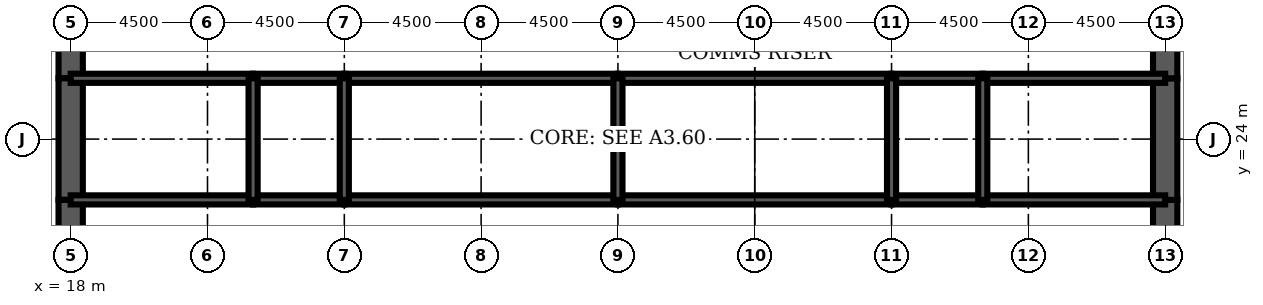
"""IFC4 building model, lengths in metres.
Left out: names, types, materials, properties, quantities, classifications, styles, units other than length and angle.
Written with IfcOpenShell. Run it as: python <this file> out.ifc"""

import sys

from ifc_helpers import new_model, si_unit, direction, frame, frame_2d, origin, place, context, subcontext, project, spatial, rectangle, extrude, element, fill, save


model = new_model("IFC4")
c1 = context("Model", 3, precision=1e-05, world=origin(), true_north=direction((0.0, 1.0)))
c2 = subcontext(c1, "Body", "Model", "MODEL_VIEW")
j1 = project(units=[si_unit("LENGTHUNIT", "METRE"), si_unit("PLANEANGLEUNIT", "RADIAN")], contexts=[c1])
p1 = place(None, origin())
s1 = spatial("IfcSite", under=j1, at=p1, CompositionType="ELEMENT")
p2 = place(p1, origin())
s2 = spatial("IfcBuilding", under=s1, at=p2, CompositionType="ELEMENT")
p3 = place(p2, frame((0.0, 0.0, 257.2)))
s3 = spatial("IfcBuildingStorey", under=s2, at=p3, CompositionType="ELEMENT", Elevation=257.2)
p4 = place(p3, frame((18.0, 28.8, 0.0), z_axis=(0.0, 0.0, 1.0), x_axis=(0.0, -1.0, 0.0)))
e1 = element("IfcWall", 1, at=p4, inside=s3, PredefinedType="SHEAR", context=c2, shape_type="SweptSolid", body=[
    extrude(rectangle(XDim=2.8, YDim=0.8, at=frame_2d((1.4, 0.0))), origin(), (0.0, 0.0, 1.0), 4.2),
])
p5 = place(p4, frame((0.4, 0.0, 0.0)))
e2 = element("IfcOpeningElement", 2, at=p5, cuts=e1, PredefinedType="OPENING", context=c2, shape_type="SweptSolid", body=[
    extrude(rectangle(XDim=1.8, YDim=2.1, at=frame_2d((0.9, 1.05))), frame((0.0, 0.41, 0.0), z_axis=(0.0, -1.0, 0.0), x_axis=(1.0, 0.0, 0.0)), (0.0, 0.0, 1.0), 0.82),
])
p6 = place(p3, frame((18.0, 26.0, 0.0), z_axis=(0.0, 0.0, 1.0), x_axis=(0.0, -1.0, 0.0)))
e3 = element("IfcWall", 3, at=p6, inside=s3, PredefinedType="SHEAR", context=c2, shape_type="SweptSolid", body=[
    extrude(rectangle(XDim=4.0, YDim=0.8, at=frame_2d((2.0, 0.0))), origin(), (0.0, 0.0, 1.0), 4.2),
])
p7 = place(p3, frame((18.0, 22.0, 0.0), z_axis=(0.0, 0.0, 1.0), x_axis=(0.0, -1.0, 0.0)))
e4 = element("IfcWall", 4, at=p7, inside=s3, PredefinedType="SHEAR", context=c2, shape_type="SweptSolid", body=[
    extrude(rectangle(XDim=2.8, YDim=0.8, at=frame_2d((1.4, 0.0))), origin(), (0.0, 0.0, 1.0), 4.2),
])
p8 = place(p7, frame((0.6, 0.0, 0.0)))
e5 = element("IfcOpeningElement", 5, at=p8, cuts=e4, PredefinedType="OPENING", context=c2, shape_type="SweptSolid", body=[
    extrude(rectangle(XDim=1.8, YDim=2.1, at=frame_2d((0.9, 1.05))), frame((0.0, 0.41, 0.0), z_axis=(0.0, -1.0, 0.0), x_axis=(1.0, 0.0, 0.0)), (0.0, 0.0, 1.0), 0.82),
])
p9 = place(p3, frame((54.0, 19.2, 0.0), z_axis=(0.0, 0.0, 1.0), x_axis=(0.0, 1.0, 0.0)))
e6 = element("IfcWall", 6, at=p9, inside=s3, PredefinedType="SHEAR", context=c2, shape_type="SweptSolid", body=[
    extrude(rectangle(XDim=2.8, YDim=0.8, at=frame_2d((1.4, 0.0))), origin(), (0.0, 0.0, 1.0), 4.2),
])
p10 = place(p9, frame((0.4, 0.0, 0.0)))
e7 = element("IfcOpeningElement", 7, at=p10, cuts=e6, PredefinedType="OPENING", context=c2, shape_type="SweptSolid", body=[
    extrude(rectangle(XDim=1.8, YDim=2.1, at=frame_2d((0.9, 1.05))), frame((0.0, 0.41, 0.0), z_axis=(0.0, -1.0, 0.0), x_axis=(1.0, 0.0, 0.0)), (0.0, 0.0, 1.0), 0.82),
])
p11 = place(p3, frame((54.0, 22.0, 0.0), z_axis=(0.0, 0.0, 1.0), x_axis=(0.0, 1.0, 0.0)))
e8 = element("IfcWall", 8, at=p11, inside=s3, PredefinedType="SHEAR", context=c2, shape_type="SweptSolid", body=[
    extrude(rectangle(XDim=4.0, YDim=0.8, at=frame_2d((2.0, 0.0))), origin(), (0.0, 0.0, 1.0), 4.2),
])
p12 = place(p3, frame((54.0, 26.0, 0.0), z_axis=(0.0, 0.0, 1.0), x_axis=(0.0, 1.0, 0.0)))
e9 = element("IfcWall", 9, at=p12, inside=s3, PredefinedType="SHEAR", context=c2, shape_type="SweptSolid", body=[
    extrude(rectangle(XDim=2.8, YDim=0.8, at=frame_2d((1.4, 0.0))), origin(), (0.0, 0.0, 1.0), 4.2),
])
p13 = place(p12, frame((0.6, 0.0, 0.0)))
e10 = element("IfcOpeningElement", 10, at=p13, cuts=e9, PredefinedType="OPENING", context=c2, shape_type="SweptSolid", body=[
    extrude(rectangle(XDim=1.8, YDim=2.1, at=frame_2d((0.9, 1.05))), frame((0.0, 0.41, 0.0), z_axis=(0.0, -1.0, 0.0), x_axis=(1.0, 0.0, 0.0)), (0.0, 0.0, 1.0), 0.82),
])
p14 = place(p3, frame((18.0, 22.0, 0.0), z_axis=(0.0, 0.0, 1.0), x_axis=(1.0, 0.0, 0.0)))
e11 = element("IfcWall", 11, at=p14, inside=s3, PredefinedType="SOLIDWALL", context=c2, shape_type="SweptSolid", body=[
    extrude(rectangle(XDim=6.0, YDim=0.3, at=frame_2d((3.0, 0.0))), origin(), (0.0, 0.0, 1.0), 4.2),
])
p15 = place(p14, frame((4.4, 0.0, 0.0)))
e12 = element("IfcOpeningElement", 12, at=p15, cuts=e11, PredefinedType="OPENING", context=c2, shape_type="SweptSolid", body=[
    extrude(rectangle(XDim=1.0, YDim=2.1, at=frame_2d((0.5, 1.05))), frame((0.0, 0.16, 0.0), z_axis=(0.0, -1.0, 0.0), x_axis=(1.0, 0.0, 0.0)), (0.0, 0.0, 1.0), 0.32),
])
p16 = place(p14, frame((0.8, 0.0, 0.0)))
e13 = element("IfcOpeningElement", 13, at=p16, cuts=e11, PredefinedType="OPENING", context=c2, shape_type="SweptSolid", body=[
    extrude(rectangle(XDim=1.0, YDim=2.1, at=frame_2d((0.5, 1.05))), frame((0.0, 0.16, 0.0), z_axis=(0.0, -1.0, 0.0), x_axis=(1.0, 0.0, 0.0)), (0.0, 0.0, 1.0), 0.32),
])
p17 = place(p3, frame((24.0, 22.0, 0.0), z_axis=(0.0, 0.0, 1.0), x_axis=(1.0, 0.0, 0.0)))
e14 = element("IfcWall", 14, at=p17, inside=s3, PredefinedType="SOLIDWALL", context=c2, shape_type="SweptSolid", body=[
    extrude(rectangle(XDim=3.0, YDim=0.3, at=frame_2d((1.5, 0.0))), origin(), (0.0, 0.0, 1.0), 4.2),
])
p18 = place(p17, frame((1.0, 0.0, 0.0)))
e15 = element("IfcOpeningElement", 15, at=p18, cuts=e14, PredefinedType="OPENING", context=c2, shape_type="SweptSolid", body=[
    extrude(rectangle(XDim=1.0, YDim=2.1, at=frame_2d((0.5, 1.05))), frame((0.0, 0.16, 0.0), z_axis=(0.0, -1.0, 0.0), x_axis=(1.0, 0.0, 0.0)), (0.0, 0.0, 1.0), 0.32),
])
p19 = place(p3, frame((27.0, 22.0, 0.0), z_axis=(0.0, 0.0, 1.0), x_axis=(1.0, 0.0, 0.0)))
e16 = element("IfcWall", 16, at=p19, inside=s3, PredefinedType="SOLIDWALL", context=c2, shape_type="SweptSolid", body=[
    extrude(rectangle(XDim=9.0, YDim=0.3, at=frame_2d((4.5, 0.0))), origin(), (0.0, 0.0, 1.0), 4.2),
])
p20 = place(p19, frame((4.0, 0.0, 0.0)))
e17 = element("IfcOpeningElement", 17, at=p20, cuts=e16, PredefinedType="OPENING", context=c2, shape_type="SweptSolid", body=[
    extrude(rectangle(XDim=1.0, YDim=2.1, at=frame_2d((0.5, 1.05))), frame((0.0, 0.16, 0.0), z_axis=(0.0, -1.0, 0.0), x_axis=(1.0, 0.0, 0.0)), (0.0, 0.0, 1.0), 0.32),
])
p21 = place(p3, frame((36.0, 22.0, 0.0), z_axis=(0.0, 0.0, 1.0), x_axis=(1.0, 0.0, 0.0)))
e18 = element("IfcWall", 18, at=p21, inside=s3, PredefinedType="SOLIDWALL", context=c2, shape_type="SweptSolid", body=[
    extrude(rectangle(XDim=9.0, YDim=0.3, at=frame_2d((4.5, 0.0))), origin(), (0.0, 0.0, 1.0), 4.2),
])
p22 = place(p21, frame((4.0, 0.0, 0.0)))
e19 = element("IfcOpeningElement", 19, at=p22, cuts=e18, PredefinedType="OPENING", context=c2, shape_type="SweptSolid", body=[
    extrude(rectangle(XDim=1.0, YDim=2.1, at=frame_2d((0.5, 1.05))), frame((0.0, 0.16, 0.0), z_axis=(0.0, -1.0, 0.0), x_axis=(1.0, 0.0, 0.0)), (0.0, 0.0, 1.0), 0.32),
])
p23 = place(p3, frame((45.0, 22.0, 0.0), z_axis=(0.0, 0.0, 1.0), x_axis=(1.0, 0.0, 0.0)))
e20 = element("IfcWall", 20, at=p23, inside=s3, PredefinedType="SOLIDWALL", context=c2, shape_type="SweptSolid", body=[
    extrude(rectangle(XDim=3.0, YDim=0.3, at=frame_2d((1.5, 0.0))), origin(), (0.0, 0.0, 1.0), 4.2),
])
p24 = place(p23, frame((1.0, 0.0, 0.0)))
e21 = element("IfcOpeningElement", 21, at=p24, cuts=e20, PredefinedType="OPENING", context=c2, shape_type="SweptSolid", body=[
    extrude(rectangle(XDim=1.0, YDim=2.1, at=frame_2d((0.5, 1.05))), frame((0.0, 0.16, 0.0), z_axis=(0.0, -1.0, 0.0), x_axis=(1.0, 0.0, 0.0)), (0.0, 0.0, 1.0), 0.32),
])
p25 = place(p3, frame((48.0, 22.0, 0.0), z_axis=(0.0, 0.0, 1.0), x_axis=(1.0, 0.0, 0.0)))
e22 = element("IfcWall", 22, at=p25, inside=s3, PredefinedType="SOLIDWALL", context=c2, shape_type="SweptSolid", body=[
    extrude(rectangle(XDim=6.0, YDim=0.3, at=frame_2d((3.0, 0.0))), origin(), (0.0, 0.0, 1.0), 4.2),
])
p26 = place(p25, frame((2.0, 0.0, 0.0)))
e23 = element("IfcOpeningElement", 23, at=p26, cuts=e22, PredefinedType="OPENING", context=c2, shape_type="SweptSolid", body=[
    extrude(rectangle(XDim=1.0, YDim=2.1, at=frame_2d((0.5, 1.05))), frame((0.0, 0.16, 0.0), z_axis=(0.0, -1.0, 0.0), x_axis=(1.0, 0.0, 0.0)), (0.0, 0.0, 1.0), 0.32),
])
p27 = place(p25, frame((4.05, 0.0, 0.0)))
e24 = element("IfcOpeningElement", 24, at=p27, cuts=e22, PredefinedType="OPENING", context=c2, shape_type="SweptSolid", body=[
    extrude(rectangle(XDim=1.0, YDim=2.1, at=frame_2d((0.5, 1.05))), frame((0.0, 0.16, 0.0), z_axis=(0.0, -1.0, 0.0), x_axis=(1.0, 0.0, 0.0)), (0.0, 0.0, 1.0), 0.32),
])
p28 = place(p3, frame((18.0, 26.0, 0.0), z_axis=(0.0, 0.0, 1.0), x_axis=(1.0, 0.0, 0.0)))
e25 = element("IfcWall", 25, at=p28, inside=s3, PredefinedType="SOLIDWALL", context=c2, shape_type="SweptSolid", body=[
    extrude(rectangle(XDim=6.0, YDim=0.3, at=frame_2d((3.0, 0.0))), origin(), (0.0, 0.0, 1.0), 4.2),
])
p29 = place(p3, frame((24.0, 26.0, 0.0), z_axis=(0.0, 0.0, 1.0), x_axis=(1.0, 0.0, 0.0)))
e26 = element("IfcWall", 26, at=p29, inside=s3, PredefinedType="SOLIDWALL", context=c2, shape_type="SweptSolid", body=[
    extrude(rectangle(XDim=3.0, YDim=0.3, at=frame_2d((1.5, 0.0))), origin(), (0.0, 0.0, 1.0), 4.2),
])
for number, where, z_axis, x_axis in (
    (27, (27.0, 26.0, 0.0), (0.0, 0.0, 1.0), (1.0, 0.0, 0.0)),
    (28, (36.0, 26.0, 0.0), (0.0, 0.0, 1.0), (1.0, 0.0, 0.0)),
):
    element("IfcWall", number, at=place(p3, frame(where, z_axis=z_axis, x_axis=x_axis)), inside=s3, PredefinedType="SOLIDWALL", context=c2, shape_type="SweptSolid", body=[
        extrude(rectangle(XDim=9.0, YDim=0.3, at=frame_2d((4.5, 0.0))), origin(), (0.0, 0.0, 1.0), 4.2),
    ])
p30 = place(p3, frame((45.0, 26.0, 0.0), z_axis=(0.0, 0.0, 1.0), x_axis=(1.0, 0.0, 0.0)))
e29 = element("IfcWall", 29, at=p30, inside=s3, PredefinedType="SOLIDWALL", context=c2, shape_type="SweptSolid", body=[
    extrude(rectangle(XDim=3.0, YDim=0.3, at=frame_2d((1.5, 0.0))), origin(), (0.0, 0.0, 1.0), 4.2),
])
p31 = place(p3, frame((48.0, 26.0, 0.0), z_axis=(0.0, 0.0, 1.0), x_axis=(1.0, 0.0, 0.0)))
e30 = element("IfcWall", 30, at=p31, inside=s3, PredefinedType="SOLIDWALL", context=c2, shape_type="SweptSolid", body=[
    extrude(rectangle(XDim=6.0, YDim=0.3, at=frame_2d((3.0, 0.0))), origin(), (0.0, 0.0, 1.0), 4.2),
])
for number, where, z_axis, x_axis in (
    (31, (24.0, 22.0, 0.0), (0.0, 0.0, 1.0), (0.0, 1.0, 0.0)),
    (32, (27.0, 22.0, 0.0), (0.0, 0.0, 1.0), (0.0, 1.0, 0.0)),
    (33, (36.0, 22.0, 0.0), (0.0, 0.0, 1.0), (0.0, 1.0, 0.0)),
    (34, (45.0, 22.0, 0.0), (0.0, 0.0, 1.0), (0.0, 1.0, 0.0)),
    (35, (48.0, 22.0, 0.0), (0.0, 0.0, 1.0), (0.0, 1.0, 0.0)),
):
    element("IfcWall", number, at=place(p3, frame(where, z_axis=z_axis, x_axis=x_axis)), inside=s3, PredefinedType="SOLIDWALL", context=c2, shape_type="SweptSolid", body=[
        extrude(rectangle(XDim=4.0, YDim=0.3, at=frame_2d((2.0, 0.0))), origin(), (0.0, 0.0, 1.0), 4.2),
    ])
p32 = place(p3, frame((38.0, 22.15, 0.0), z_axis=(0.0, 0.0, 1.0), x_axis=(0.0, 1.0, 0.0)))
e36 = element("IfcWall", 36, at=p32, inside=s3, PredefinedType="PARTITIONING", context=c2, shape_type="SweptSolid", body=[
    extrude(rectangle(XDim=3.7, YDim=0.15, at=frame_2d((1.85, 0.0))), origin(), (0.0, 0.0, 1.0), 3.0),
])
p33 = place(p32, frame((2.2, 0.0, 0.0)))
e37 = element("IfcOpeningElement", 37, at=p33, cuts=e36, PredefinedType="OPENING", context=c2, shape_type="SweptSolid", body=[
    extrude(rectangle(XDim=1.0, YDim=2.1, at=frame_2d((0.5, 1.05))), frame((0.0, 0.085, 0.0), z_axis=(0.0, -1.0, 0.0), x_axis=(1.0, 0.0, 0.0)), (0.0, 0.0, 1.0), 0.17),
])
for number, where, z_axis, x_axis in (
    (38, (20.275, 22.15, 0.0), (0.0, 0.0, 1.0), (0.0, 1.0, 0.0)),
    (39, (51.425, 22.15, 0.0), (0.0, 0.0, 1.0), (0.0, 1.0, 0.0)),
):
    element("IfcWall", number, at=place(p3, frame(where, z_axis=z_axis, x_axis=x_axis)), inside=s3, PredefinedType="PARTITIONING", context=c2, shape_type="SweptSolid", body=[
        extrude(rectangle(XDim=3.7, YDim=0.15, at=frame_2d((1.85, 0.0))), origin(), (0.0, 0.0, 1.0), 3.0),
    ])
p34 = place(p33, origin())
e40 = element("IfcDoor", 40, at=p34, inside=s3, OperationType="SINGLE_SWING_RIGHT", PredefinedType="DOOR", context=c2, shape_type="SweptSolid", body=[
    extrude(rectangle(XDim=1.0, YDim=2.1, at=frame_2d((0.5, 1.05))), frame((0.0, 0.025, 0.0), z_axis=(0.0, -1.0, 0.0), x_axis=(1.0, 0.0, 0.0)), (0.0, 0.0, 1.0), 0.05),
])
fill(e37, e40)
p35 = place(p8, origin())
e41 = element("IfcDoor", 41, at=p35, inside=s3, OperationType="SINGLE_SWING_LEFT", PredefinedType="DOOR", context=c2, shape_type="SweptSolid", body=[
    extrude(rectangle(XDim=1.8, YDim=2.1, at=frame_2d((0.9, 1.05))), frame((0.0, 0.4, 0.0), z_axis=(0.0, -1.0, 0.0), x_axis=(1.0, 0.0, 0.0)), (0.0, 0.0, 1.0), 0.8),
])
fill(e5, e41)
p36 = place(p5, origin())
e42 = element("IfcDoor", 42, at=p36, inside=s3, OperationType="SINGLE_SWING_LEFT", PredefinedType="DOOR", context=c2, shape_type="SweptSolid", body=[
    extrude(rectangle(XDim=1.8, YDim=2.1, at=frame_2d((0.9, 1.05))), frame((0.0, 0.4, 0.0), z_axis=(0.0, -1.0, 0.0), x_axis=(1.0, 0.0, 0.0)), (0.0, 0.0, 1.0), 0.8),
])
fill(e2, e42)
p37 = place(p10, origin())
e43 = element("IfcDoor", 43, at=p37, inside=s3, OperationType="SINGLE_SWING_LEFT", PredefinedType="DOOR", context=c2, shape_type="SweptSolid", body=[
    extrude(rectangle(XDim=1.8, YDim=2.1, at=frame_2d((0.9, 1.05))), frame((0.0, 0.4, 0.0), z_axis=(0.0, -1.0, 0.0), x_axis=(1.0, 0.0, 0.0)), (0.0, 0.0, 1.0), 0.8),
])
fill(e7, e43)
p38 = place(p13, origin())
e44 = element("IfcDoor", 44, at=p38, inside=s3, OperationType="SINGLE_SWING_LEFT", PredefinedType="DOOR", context=c2, shape_type="SweptSolid", body=[
    extrude(rectangle(XDim=1.8, YDim=2.1, at=frame_2d((0.9, 1.05))), frame((0.0, 0.4, 0.0), z_axis=(0.0, -1.0, 0.0), x_axis=(1.0, 0.0, 0.0)), (0.0, 0.0, 1.0), 0.8),
])
fill(e10, e44)
p39 = place(p15, origin())
e45 = element("IfcDoor", 45, at=p39, inside=s3, OperationType="SINGLE_SWING_RIGHT", PredefinedType="DOOR", context=c2, shape_type="SweptSolid", body=[
    extrude(rectangle(XDim=1.0, YDim=2.1, at=frame_2d((0.5, 1.05))), frame((0.0, 0.025, 0.0), z_axis=(0.0, -1.0, 0.0), x_axis=(1.0, 0.0, 0.0)), (0.0, 0.0, 1.0), 0.05),
])
fill(e12, e45)
p40 = place(p18, origin())
e46 = element("IfcDoor", 46, at=p40, inside=s3, OperationType="SINGLE_SWING_LEFT", PredefinedType="DOOR", context=c2, shape_type="SweptSolid", body=[
    extrude(rectangle(XDim=1.0, YDim=2.1, at=frame_2d((0.5, 1.05))), frame((0.0, 0.025, 0.0), z_axis=(0.0, -1.0, 0.0), x_axis=(1.0, 0.0, 0.0)), (0.0, 0.0, 1.0), 0.05),
])
fill(e15, e46)
p41 = place(p20, origin())
e47 = element("IfcDoor", 47, at=p41, inside=s3, OperationType="SINGLE_SWING_LEFT", PredefinedType="DOOR", context=c2, shape_type="SweptSolid", body=[
    extrude(rectangle(XDim=1.0, YDim=2.1, at=frame_2d((0.5, 1.05))), frame((0.0, 0.025, 0.0), z_axis=(0.0, -1.0, 0.0), x_axis=(1.0, 0.0, 0.0)), (0.0, 0.0, 1.0), 0.05),
])
fill(e17, e47)
p42 = place(p22, origin())
e48 = element("IfcDoor", 48, at=p42, inside=s3, OperationType="SINGLE_SWING_LEFT", PredefinedType="DOOR", context=c2, shape_type="SweptSolid", body=[
    extrude(rectangle(XDim=1.0, YDim=2.1, at=frame_2d((0.5, 1.05))), frame((0.0, 0.025, 0.0), z_axis=(0.0, -1.0, 0.0), x_axis=(1.0, 0.0, 0.0)), (0.0, 0.0, 1.0), 0.05),
])
fill(e19, e48)
p43 = place(p24, origin())
e49 = element("IfcDoor", 49, at=p43, inside=s3, OperationType="SINGLE_SWING_LEFT", PredefinedType="DOOR", context=c2, shape_type="SweptSolid", body=[
    extrude(rectangle(XDim=1.0, YDim=2.1, at=frame_2d((0.5, 1.05))), frame((0.0, 0.025, 0.0), z_axis=(0.0, -1.0, 0.0), x_axis=(1.0, 0.0, 0.0)), (0.0, 0.0, 1.0), 0.05),
])
fill(e21, e49)
p44 = place(p26, origin())
e50 = element("IfcDoor", 50, at=p44, inside=s3, OperationType="SINGLE_SWING_LEFT", PredefinedType="DOOR", context=c2, shape_type="SweptSolid", body=[
    extrude(rectangle(XDim=1.0, YDim=2.1, at=frame_2d((0.5, 1.05))), frame((0.0, 0.025, 0.0), z_axis=(0.0, -1.0, 0.0), x_axis=(1.0, 0.0, 0.0)), (0.0, 0.0, 1.0), 0.05),
])
fill(e23, e50)
p45 = place(p16, origin())
e51 = element("IfcDoor", 51, at=p45, inside=s3, OperationType="SINGLE_SWING_LEFT", PredefinedType="DOOR", context=c2, shape_type="SweptSolid", body=[
    extrude(rectangle(XDim=1.0, YDim=2.1, at=frame_2d((0.5, 1.05))), frame((0.0, 0.025, 0.0), z_axis=(0.0, -1.0, 0.0), x_axis=(1.0, 0.0, 0.0)), (0.0, 0.0, 1.0), 0.05),
])
fill(e13, e51)
p46 = place(p27, origin())
e52 = element("IfcDoor", 52, at=p46, inside=s3, OperationType="SINGLE_SWING_RIGHT", PredefinedType="DOOR", context=c2, shape_type="SweptSolid", body=[
    extrude(rectangle(XDim=1.0, YDim=2.1, at=frame_2d((0.5, 1.05))), frame((0.0, 0.025, 0.0), z_axis=(0.0, -1.0, 0.0), x_axis=(1.0, 0.0, 0.0)), (0.0, 0.0, 1.0), 0.05),
])
fill(e24, e52)
save(model, sys.argv[1])
